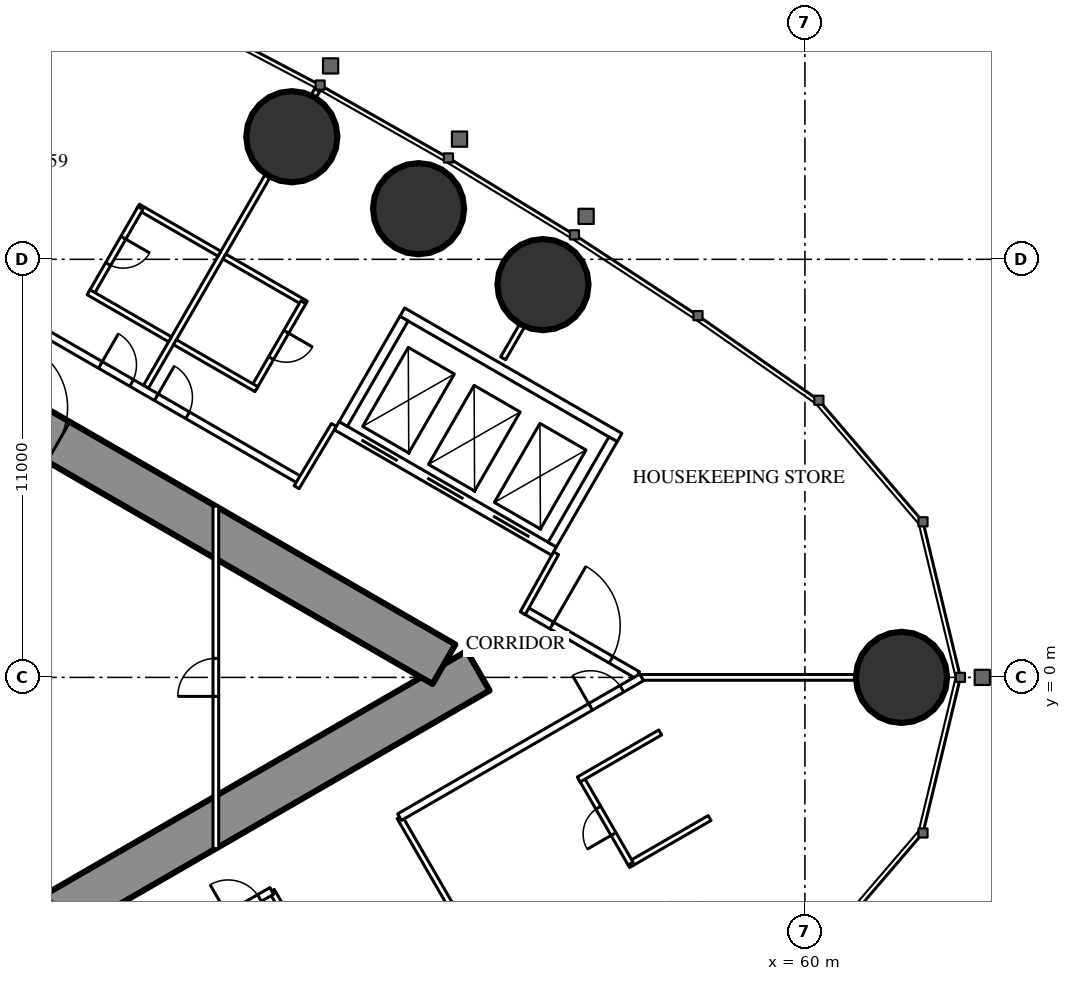
"""IFC4 building model, lengths in metres.
Left out: names, types, materials, properties, quantities, classifications, styles, units other than length and angle.
Written with IfcOpenShell. Run it as: python <this file> out.ifc"""

import sys

from ifc_helpers import new_model, si_unit, direction, frame, frame_2d, origin, origin_2d, place, context, subcontext, project, spatial, rectangle, circle, extrude, element, fill, save


model = new_model("IFC4")
c1 = context("Model", 3, precision=1e-05, world=origin(), true_north=direction((0.0, 1.0)))
c2 = subcontext(c1, "Body", "Model", "MODEL_VIEW")
j1 = project(units=[si_unit("LENGTHUNIT", "METRE"), si_unit("PLANEANGLEUNIT", "RADIAN")], contexts=[c1])
p1 = place(None, origin())
s1 = spatial("IfcSite", under=j1, at=p1, CompositionType="ELEMENT")
p2 = place(p1, origin())
s2 = spatial("IfcBuilding", under=s1, at=p2, CompositionType="ELEMENT")
p3 = place(p2, frame((0.0, 0.0, 226.1)))
s3 = spatial("IfcBuildingStorey", under=s2, at=p3, CompositionType="ELEMENT", Elevation=226.1)
for number, where, z_axis, x_axis in (
    (1, (62.542, 0.0, 0.0), (0.0, 0.0, 1.0), (1.0, 0.0, 0.0)),
    (2, (53.108, 10.334, 0.0), (0.0, 0.0, 1.0), (1.0, 0.0, 0.0)),
    (3, (49.834, 12.332, 0.0), (0.0, 0.0, 1.0), (1.0, 0.0, 0.0)),
    (4, (46.499, 14.226, 0.0), (0.0, 0.0, 1.0), (1.0, 0.0, 0.0)),
):
    element("IfcColumn", number, at=place(p3, frame(where, z_axis=z_axis, x_axis=x_axis)), inside=s3, PredefinedType="COLUMN", context=c2, shape_type="SweptSolid", body=[
        extrude(circle(Radius=1.2, at=origin_2d()), origin(), (0.0, 0.0, 1.0), 3.6),
    ])
p4 = place(p3, frame((27.2, -13.8, 0.0), z_axis=(0.0, 0.0, 1.0), x_axis=(0.866027159892, 0.499996958321, 0.0)))
e5 = element("IfcWall", 5, at=p4, inside=s3, PredefinedType="SHEAR", context=c2, shape_type="SweptSolid", body=[
    extrude(rectangle(XDim=27.947, YDim=1.2, at=frame_2d((13.973, 0.0))), origin(), (0.0, 0.0, 1.0), 3.6),
])
p5 = place(p4, frame((4.6, 0.0, 0.0)))
e6 = element("IfcOpeningElement", 6, at=p5, cuts=e5, PredefinedType="OPENING", context=c2, shape_type="SweptSolid", body=[
    extrude(rectangle(XDim=1.0, YDim=2.2, at=frame_2d((0.5, 1.1))), frame((0.0, 0.61, 0.0), z_axis=(0.0, -1.0, 0.0), x_axis=(1.0, 0.0, 0.0)), (0.0, 0.0, 1.0), 1.22),
])
p6 = place(p4, frame((13.395, 0.0, 0.0)))
e7 = element("IfcOpeningElement", 7, at=p6, cuts=e5, PredefinedType="OPENING", context=c2, shape_type="SweptSolid", body=[
    extrude(rectangle(XDim=1.8, YDim=2.2, at=frame_2d((0.9, 1.1))), frame((0.0, 0.61, 0.0), z_axis=(0.0, -1.0, 0.0), x_axis=(1.0, 0.0, 0.0)), (0.0, 0.0, 1.0), 1.22),
])
p7 = place(p3, frame((27.2, 13.8, 0.0), z_axis=(0.0, 0.0, 1.0), x_axis=(0.866024515034, -0.500001539357, 0.0)))
e8 = element("IfcWall", 8, at=p7, inside=s3, PredefinedType="SHEAR", context=c2, shape_type="SweptSolid", body=[
    extrude(rectangle(XDim=26.907, YDim=1.2, at=frame_2d((13.454, 0.0))), origin(), (0.0, 0.0, 1.0), 3.6),
])
p8 = place(p7, frame((4.6, 0.0, 0.0)))
e9 = element("IfcOpeningElement", 9, at=p8, cuts=e8, PredefinedType="OPENING", context=c2, shape_type="SweptSolid", body=[
    extrude(rectangle(XDim=1.0, YDim=2.2, at=frame_2d((0.5, 1.1))), frame((0.0, 0.61, 0.0), z_axis=(0.0, -1.0, 0.0), x_axis=(1.0, 0.0, 0.0)), (0.0, 0.0, 1.0), 1.22),
])
p9 = place(p7, frame((13.395, 0.0, 0.0)))
e10 = element("IfcOpeningElement", 10, at=p9, cuts=e8, PredefinedType="OPENING", context=c2, shape_type="SweptSolid", body=[
    extrude(rectangle(XDim=1.8, YDim=2.2, at=frame_2d((0.9, 1.1))), frame((0.0, 0.61, 0.0), z_axis=(0.0, -1.0, 0.0), x_axis=(1.0, 0.0, 0.0)), (0.0, 0.0, 1.0), 1.22),
])
p10 = place(p3, frame((45.973, -5.617, 0.0), z_axis=(0.0, 0.0, 1.0), x_axis=(0.499985856986, -0.866033569104, 0.0)))
e11 = element("IfcWall", 11, at=p10, inside=s3, PredefinedType="PARTITIONING", context=c2, shape_type="SweptSolid", body=[
    extrude(rectangle(XDim=6.526, YDim=0.15, at=frame_2d((3.263, 0.0))), origin(), (0.0, 0.0, 1.0), 2.45),
])
p11 = place(p3, frame((49.335, -3.676, 0.0), z_axis=(0.0, 0.0, 1.0), x_axis=(0.500000613642, -0.866025049498, 0.0)))
e12 = element("IfcWall", 12, at=p11, inside=s3, PredefinedType="PARTITIONING", context=c2, shape_type="SweptSolid", body=[
    extrude(rectangle(XDim=6.433, YDim=0.15, at=frame_2d((3.216, 0.0))), origin(), (0.0, 0.0, 1.0), 2.45),
])
p12 = place(p3, frame((42.66, 7.646, 0.0), z_axis=(0.0, 0.0, 1.0), x_axis=(0.499996592859, 0.866027370889, 0.0)))
e13 = element("IfcWall", 13, at=p12, inside=s3, PredefinedType="PARTITIONING", context=c2, shape_type="SweptSolid", body=[
    extrude(rectangle(XDim=6.398, YDim=0.15, at=frame_2d((3.199, 0.0))), origin(), (0.0, 0.0, 1.0), 2.45),
])
p13 = place(p3, frame((47.079, 15.3, 0.0), z_axis=(0.0, 0.0, 1.0), x_axis=(0.499212083968, 0.866479829667, 0.0)))
e14 = element("IfcWall", 14, at=p13, inside=s3, PredefinedType="PARTITIONING", context=c2, shape_type="SweptSolid", body=[
    extrude(rectangle(XDim=0.179, YDim=0.15, at=frame_2d((0.09, 0.0))), origin(), (0.0, 0.0, 1.0), 2.45),
])
p14 = place(p3, frame((55.702, 0.0, 0.0), z_axis=(0.0, 0.0, 1.0), x_axis=(1.0, 0.0, 0.0)))
e15 = element("IfcWall", 15, at=p14, inside=s3, PredefinedType="PARTITIONING", context=c2, shape_type="SweptSolid", body=[
    extrude(rectangle(XDim=5.619, YDim=0.15, at=frame_2d((2.81, 0.0))), origin(), (0.0, 0.0, 1.0), 2.45),
])
p15 = place(p3, frame((52.06, 8.396, 0.0), z_axis=(0.0, 0.0, 1.0), x_axis=(0.500095379624, 0.865970329329, 0.0)))
e16 = element("IfcWall", 16, at=p15, inside=s3, PredefinedType="PARTITIONING", context=c2, shape_type="SweptSolid", body=[
    extrude(rectangle(XDim=0.982, YDim=0.15, at=frame_2d((0.491, 0.0))), origin(), (0.0, 0.0, 1.0), 3.35),
])
p16 = place(p3, frame((28.959, 15.44, 0.0), z_axis=(0.0, 0.0, 1.0), x_axis=(0.866028936079, -0.499993881836, 0.0)))
e17 = element("IfcWall", 17, at=p16, inside=s3, PredefinedType="PARTITIONING", context=c2, shape_type="SweptSolid", body=[
    extrude(rectangle(XDim=20.503, YDim=0.2, at=frame_2d((10.251, 0.0))), origin(), (0.0, 0.0, 1.0), 3.35),
])
p17 = place(p16, frame((16.137, 0.0, 0.0)))
e18 = element("IfcOpeningElement", 18, at=p17, cuts=e17, PredefinedType="OPENING", context=c2, shape_type="SweptSolid", body=[
    extrude(rectangle(XDim=0.95, YDim=2.2, at=frame_2d((0.475, 1.1))), frame((0.0, 0.11, 0.0), z_axis=(0.0, -1.0, 0.0), x_axis=(1.0, 0.0, 0.0)), (0.0, 0.0, 1.0), 0.22),
])
p18 = place(p16, frame((14.437, 0.0, 0.0)))
e19 = element("IfcOpeningElement", 19, at=p18, cuts=e17, PredefinedType="OPENING", context=c2, shape_type="SweptSolid", body=[
    extrude(rectangle(XDim=0.95, YDim=2.2, at=frame_2d((0.475, 1.1))), frame((0.0, 0.11, 0.0), z_axis=(0.0, -1.0, 0.0), x_axis=(1.0, 0.0, 0.0)), (0.0, 0.0, 1.0), 0.22),
])
p19 = place(p16, frame((2.244, 0.0, 0.0)))
e20 = element("IfcOpeningElement", 20, at=p19, cuts=e17, PredefinedType="OPENING", context=c2, shape_type="SweptSolid", body=[
    extrude(rectangle(XDim=1.8, YDim=2.04, at=frame_2d((0.9, 1.02))), frame((0.0, 0.11, 0.0), z_axis=(0.0, -1.0, 0.0), x_axis=(1.0, 0.0, 0.0)), (0.0, 0.0, 1.0), 0.22),
])
p20 = place(p3, frame((52.639, 1.769, 0.0), z_axis=(0.0, 0.0, 1.0), x_axis=(0.866027340901, -0.4999966448, 0.0)))
e21 = element("IfcWall", 21, at=p20, inside=s3, PredefinedType="PARTITIONING", context=c2, shape_type="SweptSolid", body=[
    extrude(rectangle(XDim=3.417, YDim=0.2, at=frame_2d((1.708, 0.0))), origin(), (0.0, 0.0, 1.0), 3.35),
])
p21 = place(p20, frame((0.809, 0.0, 0.0)))
e22 = element("IfcOpeningElement", 22, at=p21, cuts=e21, PredefinedType="OPENING", context=c2, shape_type="SweptSolid", body=[
    extrude(rectangle(XDim=1.8, YDim=2.2, at=frame_2d((0.9, 1.1))), frame((0.0, 0.11, 0.0), z_axis=(0.0, -1.0, 0.0), x_axis=(1.0, 0.0, 0.0)), (0.0, 0.0, 1.0), 0.22),
])
p22 = place(p3, frame((47.606, 6.642, 0.0), z_axis=(0.0, 0.0, 1.0), x_axis=(-0.51353662755, -0.858067673418, 0.0)))
e23 = element("IfcWall", 23, at=p22, inside=s3, PredefinedType="PARTITIONING", context=c2, shape_type="SweptSolid", body=[
    extrude(rectangle(XDim=1.91, YDim=0.15, at=frame_2d((0.955, 0.0))), origin(), (0.0, 0.0, 1.0), 3.35),
])
p23 = place(p3, frame((52.576, 1.689, 0.0), z_axis=(0.0, 0.0, 1.0), x_axis=(0.485424724123, 0.874278466629, 0.0)))
e24 = element("IfcWall", 24, at=p23, inside=s3, PredefinedType="PARTITIONING", context=c2, shape_type="SweptSolid", body=[
    extrude(rectangle(XDim=1.805, YDim=0.15, at=frame_2d((0.903, 0.0))), origin(), (0.0, 0.0, 1.0), 3.35),
])
p24 = place(p3, frame((55.349, -4.938, 0.0), z_axis=(0.0, 0.0, 1.0), x_axis=(0.866006523861, 0.500032699561, 0.0)))
e25 = element("IfcWall", 25, at=p24, inside=s3, PredefinedType="PARTITIONING", context=c2, shape_type="SweptSolid", body=[
    extrude(rectangle(XDim=2.475, YDim=0.15, at=frame_2d((1.237, 0.0))), origin(), (0.0, 0.0, 1.0), 3.35),
])
p25 = place(p3, frame((54.114, -2.649, 0.0), z_axis=(0.0, 0.0, 1.0), x_axis=(0.500006934395, -0.866021400173, 0.0)))
e26 = element("IfcWall", 26, at=p25, inside=s3, PredefinedType="PARTITIONING", context=c2, shape_type="SweptSolid", body=[
    extrude(rectangle(XDim=2.6, YDim=0.15, at=frame_2d((1.3, 0.0))), origin(), (0.0, 0.0, 1.0), 3.35),
])
p26 = place(p25, frame((0.9, 0.0, 0.0)))
e27 = element("IfcOpeningElement", 27, at=p26, cuts=e26, PredefinedType="OPENING", context=c2, shape_type="SweptSolid", body=[
    extrude(rectangle(XDim=0.8, YDim=2.2, at=frame_2d((0.4, 1.1))), frame((0.0, 0.085, 0.0), z_axis=(0.0, -1.0, 0.0), x_axis=(1.0, 0.0, 0.0)), (0.0, 0.0, 1.0), 0.17),
])
for number, where, z_axis, x_axis in (
    (28, (54.049, -2.687, 0.0), (0.0, 0.0, 1.0), (0.866, 0.5, 0.0)),
    (29, (44.725, 11.072, 0.0), (0.0, 0.0, 1.0), (0.866, -0.5, 0.0)),
):
    element("IfcWall", number, at=place(p3, frame(where, z_axis=z_axis, x_axis=x_axis)), inside=s3, PredefinedType="PARTITIONING", context=c2, shape_type="SweptSolid", body=[
        extrude(rectangle(XDim=2.475, YDim=0.15, at=frame_2d((1.237, 0.0))), origin(), (0.0, 0.0, 1.0), 3.35),
    ])
p27 = place(p3, frame((45.503, 7.621, 0.0), z_axis=(0.0, 0.0, 1.0), x_axis=(0.500006934395, 0.866021400173, 0.0)))
e30 = element("IfcWall", 30, at=p27, inside=s3, PredefinedType="PARTITIONING", context=c2, shape_type="SweptSolid", body=[
    extrude(rectangle(XDim=2.6, YDim=0.15, at=frame_2d((1.3, 0.0))), origin(), (0.0, 0.0, 1.0), 3.35),
])
p28 = place(p27, frame((0.9, 0.0, 0.0)))
e31 = element("IfcOpeningElement", 31, at=p28, cuts=e30, PredefinedType="OPENING", context=c2, shape_type="SweptSolid", body=[
    extrude(rectangle(XDim=0.8, YDim=2.2, at=frame_2d((0.4, 1.1))), frame((0.0, 0.085, 0.0), z_axis=(0.0, -1.0, 0.0), x_axis=(1.0, 0.0, 0.0)), (0.0, 0.0, 1.0), 0.17),
])
p29 = place(p3, frame((43.425, 8.821, 0.0), z_axis=(0.0, 0.0, 1.0), x_axis=(0.866006523861, -0.500032699561, 0.0)))
e32 = element("IfcWall", 32, at=p29, inside=s3, PredefinedType="PARTITIONING", context=c2, shape_type="SweptSolid", body=[
    extrude(rectangle(XDim=2.475, YDim=0.15, at=frame_2d((1.237, 0.0))), origin(), (0.0, 0.0, 1.0), 2.5),
])
p30 = place(p3, frame((42.451, 12.385, 0.0), z_axis=(0.0, 0.0, 1.0), x_axis=(0.866031185235, -0.4999899861, 0.0)))
e33 = element("IfcWall", 33, at=p30, inside=s3, PredefinedType="PARTITIONING", context=c2, shape_type="SweptSolid", body=[
    extrude(rectangle(XDim=2.475, YDim=0.15, at=frame_2d((1.238, 0.0))), origin(), (0.0, 0.0, 1.0), 3.35),
])
p31 = place(p3, frame((41.216, 10.095, 0.0), z_axis=(0.0, 0.0, 1.0), x_axis=(0.499936506574, 0.866062058628, 0.0)))
e34 = element("IfcWall", 34, at=p31, inside=s3, PredefinedType="PARTITIONING", context=c2, shape_type="SweptSolid", body=[
    extrude(rectangle(XDim=2.6, YDim=0.15, at=frame_2d((1.3, 0.0))), origin(), (0.0, 0.0, 1.0), 3.35),
])
p32 = place(p31, frame((0.9, 0.0, 0.0)))
e35 = element("IfcOpeningElement", 35, at=p32, cuts=e34, PredefinedType="OPENING", context=c2, shape_type="SweptSolid", body=[
    extrude(rectangle(XDim=0.8, YDim=2.2, at=frame_2d((0.4, 1.1))), frame((0.0, 0.085, 0.0), z_axis=(0.0, -1.0, 0.0), x_axis=(1.0, 0.0, 0.0)), (0.0, 0.0, 1.0), 0.17),
])
p33 = place(p3, frame((41.151, 10.133, 0.0), z_axis=(0.0, 0.0, 1.0), x_axis=(0.866006523861, -0.500032699561, 0.0)))
e36 = element("IfcWall", 36, at=p33, inside=s3, PredefinedType="PARTITIONING", context=c2, shape_type="SweptSolid", body=[
    extrude(rectangle(XDim=2.475, YDim=0.15, at=frame_2d((1.237, 0.0))), origin(), (0.0, 0.0, 1.0), 2.5),
])
p34 = place(p3, frame((28.959, -15.44, 0.0), z_axis=(0.0, 0.0, 1.0), x_axis=(0.866025204199, 0.500000345692, 0.0)))
e37 = element("IfcWall", 37, at=p34, inside=s3, PredefinedType="PARTITIONING", context=c2, shape_type="SweptSolid", body=[
    extrude(rectangle(XDim=19.646, YDim=0.2, at=frame_2d((9.823, 0.0))), origin(), (0.0, 0.0, 1.0), 3.35),
])
p35 = place(p34, frame((1.494, 0.0, 0.0)))
e38 = element("IfcOpeningElement", 38, at=p35, cuts=e37, PredefinedType="OPENING", context=c2, shape_type="SweptSolid", body=[
    extrude(rectangle(XDim=1.8, YDim=2.04, at=frame_2d((0.9, 1.02))), frame((0.0, 0.11, 0.0), z_axis=(0.0, -1.0, 0.0), x_axis=(1.0, 0.0, 0.0)), (0.0, 0.0, 1.0), 0.22),
])
p36 = place(p34, frame((7.687, 0.0, 0.0)))
e39 = element("IfcOpeningElement", 39, at=p36, cuts=e37, PredefinedType="OPENING", context=c2, shape_type="SweptSolid", body=[
    extrude(rectangle(XDim=1.0, YDim=2.2, at=frame_2d((0.5, 1.1))), frame((0.0, 0.11, 0.0), z_axis=(0.0, -1.0, 0.0), x_axis=(1.0, 0.0, 0.0)), (0.0, 0.0, 1.0), 0.22),
])
p37 = place(p34, frame((18.321, 0.0, 0.0)))
e40 = element("IfcOpeningElement", 40, at=p37, cuts=e37, PredefinedType="OPENING", context=c2, shape_type="SweptSolid", body=[
    extrude(rectangle(XDim=0.95, YDim=2.2, at=frame_2d((0.475, 1.1))), frame((0.0, 0.11, 0.0), z_axis=(0.0, -1.0, 0.0), x_axis=(1.0, 0.0, 0.0)), (0.0, 0.0, 1.0), 0.22),
])
p38 = place(p3, frame((49.335, -3.676, 0.0), z_axis=(0.0, 0.0, 1.0), x_axis=(0.866021344046, 0.500007031608, 0.0)))
e41 = element("IfcWall", 41, at=p38, inside=s3, PredefinedType="PARTITIONING", context=c2, shape_type="SweptSolid", body=[
    extrude(rectangle(XDim=7.352, YDim=0.2, at=frame_2d((3.676, 0.0))), origin(), (0.0, 0.0, 1.0), 3.35),
])
p39 = place(p38, frame((5.802, 0.0, 0.0)))
e42 = element("IfcOpeningElement", 42, at=p39, cuts=e41, PredefinedType="OPENING", context=c2, shape_type="SweptSolid", body=[
    extrude(rectangle(XDim=0.95, YDim=2.2, at=frame_2d((0.475, 1.1))), frame((0.0, 0.11, 0.0), z_axis=(0.0, -1.0, 0.0), x_axis=(1.0, 0.0, 0.0)), (0.0, 0.0, 1.0), 0.22),
])
p40 = place(p3, frame((44.5, -4.505, 0.0), z_axis=(0.0, 0.0, 1.0), x_axis=(0.0, 1.0, 0.0)))
e43 = element("IfcWall", 43, at=p40, inside=s3, PredefinedType="PARTITIONING", context=c2, shape_type="SweptSolid", body=[
    extrude(rectangle(XDim=9.009, YDim=0.15, at=frame_2d((4.505, 0.0))), origin(), (0.0, 0.0, 1.0), 3.35),
])
p41 = place(p40, frame((4.005, 0.0, 0.0)))
e44 = element("IfcOpeningElement", 44, at=p41, cuts=e43, PredefinedType="OPENING", context=c2, shape_type="SweptSolid", body=[
    extrude(rectangle(XDim=1.0, YDim=2.2, at=frame_2d((0.5, 1.1))), frame((0.0, 0.085, 0.0), z_axis=(0.0, -1.0, 0.0), x_axis=(1.0, 0.0, 0.0)), (0.0, 0.0, 1.0), 0.17),
])
p42 = place(p3, frame((47.681, 6.622, 0.0), z_axis=(0.0, 0.0, 1.0), x_axis=(0.86603344179, -0.499986077507, 0.0)))
e45 = element("IfcWall", 45, at=p42, inside=s3, PredefinedType="PARTITIONING", context=c2, shape_type="SweptSolid", body=[
    extrude(rectangle(XDim=6.6, YDim=0.25, at=frame_2d((3.3, 0.0))), origin(), (0.0, 0.0, 1.0), 3.35),
])
p43 = place(p42, frame((0.75, 0.0, 0.0)))
e46 = element("IfcOpeningElement", 46, at=p43, cuts=e45, PredefinedType="OPENING", context=c2, shape_type="SweptSolid", body=[
    extrude(rectangle(XDim=1.1, YDim=2.2, at=frame_2d((0.55, 1.1))), frame((0.0, 0.135, 0.0), z_axis=(0.0, -1.0, 0.0), x_axis=(1.0, 0.0, 0.0)), (0.0, 0.0, 1.0), 0.27),
])
p44 = place(p42, frame((2.75, 0.0, 0.0)))
e47 = element("IfcOpeningElement", 47, at=p44, cuts=e45, PredefinedType="OPENING", context=c2, shape_type="SweptSolid", body=[
    extrude(rectangle(XDim=1.1, YDim=2.2, at=frame_2d((0.55, 1.1))), frame((0.0, 0.135, 0.0), z_axis=(0.0, -1.0, 0.0), x_axis=(1.0, 0.0, 0.0)), (0.0, 0.0, 1.0), 0.27),
])
p45 = place(p42, frame((4.75, 0.0, 0.0)))
e48 = element("IfcOpeningElement", 48, at=p45, cuts=e45, PredefinedType="OPENING", context=c2, shape_type="SweptSolid", body=[
    extrude(rectangle(XDim=1.1, YDim=2.2, at=frame_2d((0.55, 1.1))), frame((0.0, 0.135, 0.0), z_axis=(0.0, -1.0, 0.0), x_axis=(1.0, 0.0, 0.0)), (0.0, 0.0, 1.0), 0.27),
])
p46 = place(p3, frame((49.406, 9.611, 0.0), z_axis=(0.0, 0.0, 1.0), x_axis=(0.86603344179, -0.499986077507, 0.0)))
e49 = element("IfcWall", 49, at=p46, inside=s3, PredefinedType="PARTITIONING", context=c2, shape_type="SweptSolid", body=[
    extrude(rectangle(XDim=6.6, YDim=0.25, at=frame_2d((3.3, 0.0))), origin(), (0.0, 0.0, 1.0), 3.35),
])
p47 = place(p3, frame((47.852, 6.668, 0.0), z_axis=(0.0, 0.0, 1.0), x_axis=(0.499929347863, 0.866066190972, 0.0)))
e50 = element("IfcWall", 50, at=p47, inside=s3, PredefinedType="PARTITIONING", context=c2, shape_type="SweptSolid", body=[
    extrude(rectangle(XDim=3.201, YDim=0.25, at=frame_2d((1.6, 0.0))), origin(), (0.0, 0.0, 1.0), 3.35),
])
p48 = place(p3, frame((53.352, 3.493, 0.0), z_axis=(0.0, 0.0, 1.0), x_axis=(0.499872130319, 0.866099216793, 0.0)))
e51 = element("IfcWall", 51, at=p48, inside=s3, PredefinedType="PARTITIONING", context=c2, shape_type="SweptSolid", body=[
    extrude(rectangle(XDim=3.2, YDim=0.25, at=frame_2d((1.6, 0.0))), origin(), (0.0, 0.0, 1.0), 3.35),
])
p49 = place(p37, origin())
e52 = element("IfcDoor", 52, at=p49, inside=s3, OperationType="SINGLE_SWING_LEFT", PredefinedType="DOOR", context=c2, shape_type="SweptSolid", body=[
    extrude(rectangle(XDim=0.95, YDim=2.2, at=frame_2d((0.475, 1.1))), frame((0.0, 0.025, 0.0), z_axis=(0.0, -1.0, 0.0), x_axis=(1.0, 0.0, 0.0)), (0.0, 0.0, 1.0), 0.05),
])
fill(e40, e52)
p50 = place(p26, origin())
e53 = element("IfcDoor", 53, at=p50, inside=s3, OperationType="SINGLE_SWING_RIGHT", PredefinedType="DOOR", context=c2, shape_type="SweptSolid", body=[
    extrude(rectangle(XDim=0.8, YDim=2.2, at=frame_2d((0.4, 1.1))), frame((0.0, 0.025, 0.0), z_axis=(0.0, -1.0, 0.0), x_axis=(1.0, 0.0, 0.0)), (0.0, 0.0, 1.0), 0.05),
])
fill(e27, e53)
p51 = place(p39, origin())
e54 = element("IfcDoor", 54, at=p51, inside=s3, OperationType="SINGLE_SWING_LEFT", PredefinedType="DOOR", context=c2, shape_type="SweptSolid", body=[
    extrude(rectangle(XDim=0.95, YDim=2.2, at=frame_2d((0.475, 1.1))), frame((0.0, 0.025, 0.0), z_axis=(0.0, -1.0, 0.0), x_axis=(1.0, 0.0, 0.0)), (0.0, 0.0, 1.0), 0.05),
])
fill(e42, e54)
p52 = place(p28, origin())
e55 = element("IfcDoor", 55, at=p52, inside=s3, OperationType="SINGLE_SWING_RIGHT", PredefinedType="DOOR", context=c2, shape_type="SweptSolid", body=[
    extrude(rectangle(XDim=0.8, YDim=2.2, at=frame_2d((0.4, 1.1))), frame((0.0, 0.025, 0.0), z_axis=(0.0, -1.0, 0.0), x_axis=(1.0, 0.0, 0.0)), (0.0, 0.0, 1.0), 0.05),
])
fill(e31, e55)
p53 = place(p17, origin())
e56 = element("IfcDoor", 56, at=p53, inside=s3, OperationType="SINGLE_SWING_LEFT", PredefinedType="DOOR", context=c2, shape_type="SweptSolid", body=[
    extrude(rectangle(XDim=0.95, YDim=2.2, at=frame_2d((0.475, 1.1))), frame((0.0, 0.025, 0.0), z_axis=(0.0, -1.0, 0.0), x_axis=(1.0, 0.0, 0.0)), (0.0, 0.0, 1.0), 0.05),
])
fill(e18, e56)
p54 = place(p32, origin())
e57 = element("IfcDoor", 57, at=p54, inside=s3, OperationType="SINGLE_SWING_RIGHT", PredefinedType="DOOR", context=c2, shape_type="SweptSolid", body=[
    extrude(rectangle(XDim=0.8, YDim=2.2, at=frame_2d((0.4, 1.1))), frame((0.0, 0.025, 0.0), z_axis=(0.0, -1.0, 0.0), x_axis=(1.0, 0.0, 0.0)), (0.0, 0.0, 1.0), 0.05),
])
fill(e35, e57)
p55 = place(p18, origin())
e58 = element("IfcDoor", 58, at=p55, inside=s3, OperationType="SINGLE_SWING_LEFT", PredefinedType="DOOR", context=c2, shape_type="SweptSolid", body=[
    extrude(rectangle(XDim=0.95, YDim=2.2, at=frame_2d((0.475, 1.1))), frame((0.0, 0.025, 0.0), z_axis=(0.0, -1.0, 0.0), x_axis=(1.0, 0.0, 0.0)), (0.0, 0.0, 1.0), 0.05),
])
fill(e19, e58)
p56 = place(p21, origin())
e59 = element("IfcDoor", 59, at=p56, inside=s3, OperationType="DOUBLE_DOOR_SINGLE_SWING", PredefinedType="DOOR", context=c2, shape_type="SweptSolid", body=[
    extrude(rectangle(XDim=1.8, YDim=2.2, at=frame_2d((0.9, 1.1))), frame((0.0, 0.025, 0.0), z_axis=(0.0, -1.0, 0.0), x_axis=(1.0, 0.0, 0.0)), (0.0, 0.0, 1.0), 0.05),
])
fill(e22, e59)
p57 = place(p41, origin())
e60 = element("IfcDoor", 60, at=p57, inside=s3, OperationType="SINGLE_SWING_LEFT", PredefinedType="DOOR", context=c2, shape_type="SweptSolid", body=[
    extrude(rectangle(XDim=1.0, YDim=2.2, at=frame_2d((0.5, 1.1))), frame((0.0, 0.025, 0.0), z_axis=(0.0, -1.0, 0.0), x_axis=(1.0, 0.0, 0.0)), (0.0, 0.0, 1.0), 0.05),
])
fill(e44, e60)
p58 = place(p9, origin())
e61 = element("IfcDoor", 61, at=p58, inside=s3, OperationType="DOUBLE_DOOR_SINGLE_SWING", PredefinedType="DOOR", context=c2, shape_type="SweptSolid", body=[
    extrude(rectangle(XDim=1.8, YDim=2.2, at=frame_2d((0.9, 1.1))), frame((0.0, 0.025, 0.0), z_axis=(0.0, -1.0, 0.0), x_axis=(1.0, 0.0, 0.0)), (0.0, 0.0, 1.0), 0.05),
])
fill(e10, e61)
p59 = place(p43, origin())
e62 = element("IfcDoor", 62, at=p59, inside=s3, OperationType="DOUBLE_DOOR_SLIDING", PredefinedType="USERDEFINED", context=c2, shape_type="SweptSolid", body=[
    extrude(rectangle(XDim=1.1, YDim=2.2, at=frame_2d((0.55, 1.1))), frame((0.0, 0.025, 0.0), z_axis=(0.0, -1.0, 0.0), x_axis=(1.0, 0.0, 0.0)), (0.0, 0.0, 1.0), 0.05),
])
fill(e46, e62)
p60 = place(p44, origin())
e63 = element("IfcDoor", 63, at=p60, inside=s3, OperationType="DOUBLE_DOOR_SLIDING", PredefinedType="USERDEFINED", context=c2, shape_type="SweptSolid", body=[
    extrude(rectangle(XDim=1.1, YDim=2.2, at=frame_2d((0.55, 1.1))), frame((0.0, 0.025, 0.0), z_axis=(0.0, -1.0, 0.0), x_axis=(1.0, 0.0, 0.0)), (0.0, 0.0, 1.0), 0.05),
])
fill(e47, e63)
p61 = place(p45, origin())
e64 = element("IfcDoor", 64, at=p61, inside=s3, OperationType="DOUBLE_DOOR_SLIDING", PredefinedType="USERDEFINED", context=c2, shape_type="SweptSolid", body=[
    extrude(rectangle(XDim=1.1, YDim=2.2, at=frame_2d((0.55, 1.1))), frame((0.0, 0.025, 0.0), z_axis=(0.0, -1.0, 0.0), x_axis=(1.0, 0.0, 0.0)), (0.0, 0.0, 1.0), 0.05),
])
fill(e48, e64)
save(model, sys.argv[1])
